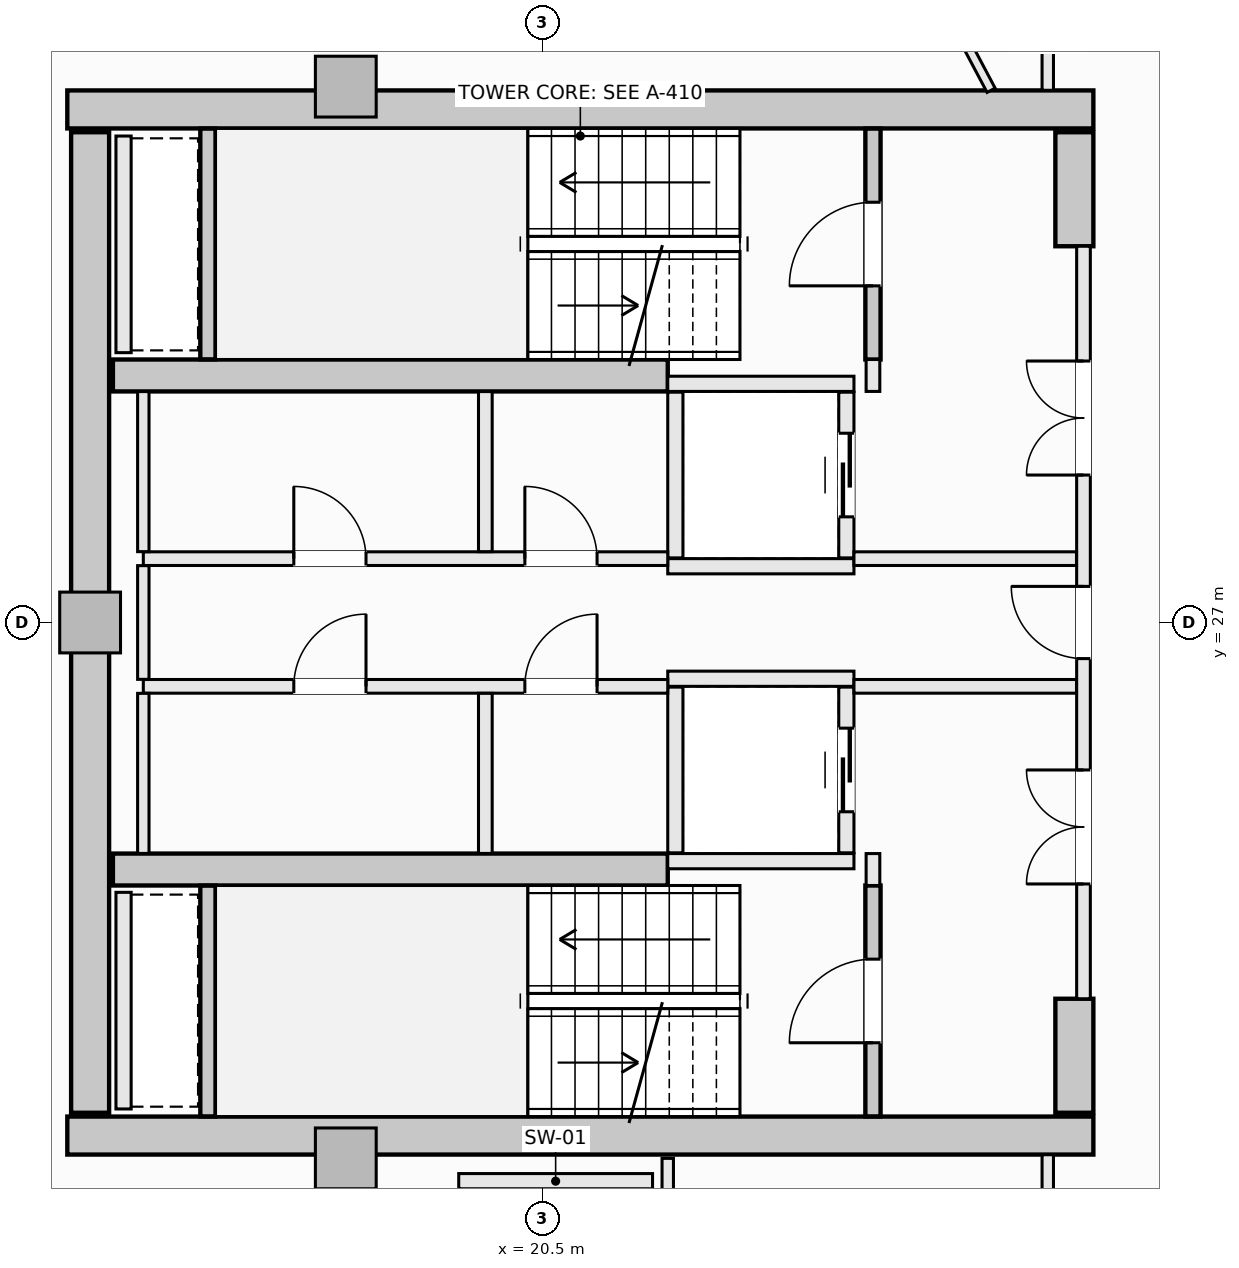
"""IFC4 building model, lengths in metres.
Left out: names, types, materials, properties, quantities, classifications, styles, units other than length and angle.
Written with IfcOpenShell. Run it as: python <this file> out.ifc"""

import sys

from ifc_helpers import new_model, si_unit, direction, frame, frame_2d, origin, origin_2d, place, context, subcontext, project, spatial, rectangle, extrude, element, fill, save


model = new_model("IFC4")
c1 = context("Model", 3, precision=1e-05, world=origin(), true_north=direction((0.0, 1.0)))
c2 = subcontext(c1, "Body", "Model", "MODEL_VIEW")
j1 = project(units=[si_unit("LENGTHUNIT", "METRE"), si_unit("PLANEANGLEUNIT", "RADIAN")], contexts=[c1])
p1 = place(None, origin())
s1 = spatial("IfcSite", under=j1, at=p1, CompositionType="ELEMENT")
p2 = place(p1, origin())
s2 = spatial("IfcBuilding", under=s1, at=p2, CompositionType="ELEMENT")
p3 = place(p2, frame((0.0, 0.0, 209.6)))
s3 = spatial("IfcBuildingStorey", under=s2, at=p3, CompositionType="ELEMENT", Elevation=209.6)
for number, where, z_axis, x_axis in (
    (1, (14.25, 33.75, -0.27), (0.0, 0.0, 1.0), (1.0, 0.0, 0.0)),
    (2, (14.25, 20.25, -0.27), (0.0, 0.0, 1.0), (1.0, 0.0, 0.0)),
):
    element("IfcWall", number, at=place(p3, frame(where, z_axis=z_axis, x_axis=x_axis)), inside=s3, PredefinedType="SHEAR", context=c2, shape_type="SweptSolid", body=[
        extrude(rectangle(XDim=13.5, YDim=0.5, at=frame_2d((6.75, 0.0))), origin(), (0.0, 0.0, 1.0), 3.3),
    ])
p4 = place(p3, frame((14.55, 20.55, -0.27), z_axis=(0.0, 0.0, 1.0), x_axis=(0.0, 1.0, 0.0)))
e3 = element("IfcWall", 3, at=p4, inside=s3, PredefinedType="SHEAR", context=c2, shape_type="SweptSolid", body=[
    extrude(rectangle(XDim=12.9, YDim=0.5, at=frame_2d((6.45, 0.0))), origin(), (0.0, 0.0, 1.0), 3.3),
])
for number, where, z_axis, x_axis in (
    (4, (27.5, 31.95, -0.27), (0.0, 0.0, 1.0), (0.0, 1.0, 0.0)),
    (5, (27.5, 20.55, -0.27), (0.0, 0.0, 1.0), (0.0, 1.0, 0.0)),
):
    element("IfcWall", number, at=place(p3, frame(where, z_axis=z_axis, x_axis=x_axis)), inside=s3, PredefinedType="SHEAR", context=c2, shape_type="SweptSolid", body=[
        extrude(rectangle(XDim=1.5, YDim=0.5, at=frame_2d((0.75, 0.0))), origin(), (0.0, 0.0, 1.0), 3.3),
    ])
for number, where, z_axis, x_axis in (
    (6, (14.85, 30.25, -0.27), (0.0, 0.0, 1.0), (1.0, 0.0, 0.0)),
    (7, (14.85, 23.75, -0.27), (0.0, 0.0, 1.0), (1.0, 0.0, 0.0)),
):
    element("IfcWall", number, at=place(p3, frame(where, z_axis=z_axis, x_axis=x_axis)), inside=s3, PredefinedType="SHEAR", context=c2, shape_type="SweptSolid", body=[
        extrude(rectangle(XDim=7.3, YDim=0.42, at=frame_2d((3.65, 0.0))), origin(), (0.0, 0.0, 1.0), 3.3),
    ])
for number, where, z_axis, x_axis in (
    (8, (17.914, 34.05, -0.27), (0.0, 0.0, 1.0), (1.0, 0.0, 0.0)),
    (9, (14.55, 27.0, -0.27), (0.0, 0.0, 1.0), (1.0, 0.0, 0.0)),
    (10, (17.914, 19.95, -0.27), (0.0, 0.0, 1.0), (1.0, 0.0, 0.0)),
):
    element("IfcColumn", number, at=place(p3, frame(where, z_axis=z_axis, x_axis=x_axis)), inside=s3, PredefinedType="PILASTER", context=c2, shape_type="SweptSolid", body=[
        extrude(rectangle(XDim=0.8, YDim=0.8, at=origin_2d()), origin(), (0.0, 0.0, 1.0), 3.3),
    ])
p5 = place(p3, frame((24.85, 30.46, -0.27), z_axis=(0.0, 0.0, 1.0), x_axis=(0.0, 1.0, 0.0)))
e11 = element("IfcWall", 11, at=p5, inside=s3, PredefinedType="SHEAR", context=c2, shape_type="SweptSolid", body=[
    extrude(rectangle(XDim=3.038, YDim=0.2, at=frame_2d((1.519, 0.0))), origin(), (0.0, 0.0, 1.0), 3.3),
])
p6 = place(p5, frame((0.969, 0.0, 0.27)))
e12 = element("IfcOpeningElement", 12, at=p6, cuts=e11, PredefinedType="OPENING", context=c2, shape_type="SweptSolid", body=[
    extrude(rectangle(XDim=1.1, YDim=2.15, at=frame_2d((0.55, 1.075))), frame((0.0, 0.11, 0.0), z_axis=(0.0, -1.0, 0.0), x_axis=(1.0, 0.0, 0.0)), (0.0, 0.0, 1.0), 0.22),
])
p7 = place(p3, frame((16.1, 30.462, -0.27), z_axis=(0.0, 0.0, 1.0), x_axis=(0.0, 1.0, 0.0)))
e13 = element("IfcWall", 13, at=p7, inside=s3, PredefinedType="SHEAR", context=c2, shape_type="SweptSolid", body=[
    extrude(rectangle(XDim=3.036, YDim=0.2, at=frame_2d((1.518, 0.0))), origin(), (0.0, 0.0, 1.0), 3.3),
])
p8 = place(p3, frame((24.85, 20.502, -0.27), z_axis=(0.0, 0.0, 1.0), x_axis=(0.0, 1.0, 0.0)))
e14 = element("IfcWall", 14, at=p8, inside=s3, PredefinedType="SHEAR", context=c2, shape_type="SweptSolid", body=[
    extrude(rectangle(XDim=3.038, YDim=0.2, at=frame_2d((1.519, 0.0))), origin(), (0.0, 0.0, 1.0), 3.3),
])
p9 = place(p8, frame((0.969, 0.0, 0.27)))
e15 = element("IfcOpeningElement", 15, at=p9, cuts=e14, PredefinedType="OPENING", context=c2, shape_type="SweptSolid", body=[
    extrude(rectangle(XDim=1.1, YDim=2.15, at=frame_2d((0.55, 1.075))), frame((0.0, 0.11, 0.0), z_axis=(0.0, -1.0, 0.0), x_axis=(1.0, 0.0, 0.0)), (0.0, 0.0, 1.0), 0.22),
])
p10 = place(p3, frame((16.1, 20.502, -0.27), z_axis=(0.0, 0.0, 1.0), x_axis=(0.0, 1.0, 0.0)))
e16 = element("IfcWall", 16, at=p10, inside=s3, PredefinedType="SHEAR", context=c2, shape_type="SweptSolid", body=[
    extrude(rectangle(XDim=3.036, YDim=0.2, at=frame_2d((1.518, 0.0))), origin(), (0.0, 0.0, 1.0), 3.3),
])
for number, where, z_axis, x_axis in (
    (17, (22.15, 30.14, 0.0), (0.0, 0.0, 1.0), (1.0, 0.0, 0.0)),
    (18, (22.15, 27.74, 0.0), (0.0, 0.0, 1.0), (1.0, 0.0, 0.0)),
):
    element("IfcWall", number, at=place(p3, frame(where, z_axis=z_axis, x_axis=x_axis)), inside=s3, PredefinedType="SOLIDWALL", context=c2, shape_type="SweptSolid", body=[
        extrude(rectangle(XDim=2.45, YDim=0.2, at=frame_2d((1.225, 0.0))), origin(), (0.0, 0.0, 1.0), 3.03),
    ])
p11 = place(p3, frame((22.25, 27.85, 0.0), z_axis=(0.0, 0.0, 1.0), x_axis=(0.0, 1.0, 0.0)))
e19 = element("IfcWall", 19, at=p11, inside=s3, PredefinedType="SOLIDWALL", context=c2, shape_type="SweptSolid", body=[
    extrude(rectangle(XDim=2.18, YDim=0.2, at=frame_2d((1.09, 0.0))), origin(), (0.0, 0.0, 1.0), 3.03),
])
p12 = place(p3, frame((24.5, 27.85, 0.0), z_axis=(0.0, 0.0, 1.0), x_axis=(0.0, 1.0, 0.0)))
e20 = element("IfcWall", 20, at=p12, inside=s3, PredefinedType="SOLIDWALL", context=c2, shape_type="SweptSolid", body=[
    extrude(rectangle(XDim=2.18, YDim=0.2, at=frame_2d((1.09, 0.0))), origin(), (0.0, 0.0, 1.0), 3.03),
])
p13 = place(p12, frame((0.54, 0.0, 0.0)))
e21 = element("IfcOpeningElement", 21, at=p13, cuts=e20, PredefinedType="OPENING", context=c2, shape_type="SweptSolid", body=[
    extrude(rectangle(XDim=1.1, YDim=2.2, at=frame_2d((0.55, 1.1))), frame((0.0, 0.11, 0.0), z_axis=(0.0, -1.0, 0.0), x_axis=(1.0, 0.0, 0.0)), (0.0, 0.0, 1.0), 0.22),
])
for number, where, z_axis, x_axis in (
    (22, (22.15, 26.26, 0.0), (0.0, 0.0, 1.0), (1.0, 0.0, 0.0)),
    (23, (22.15, 23.86, 0.0), (0.0, 0.0, 1.0), (1.0, 0.0, 0.0)),
):
    element("IfcWall", number, at=place(p3, frame(where, z_axis=z_axis, x_axis=x_axis)), inside=s3, PredefinedType="SOLIDWALL", context=c2, shape_type="SweptSolid", body=[
        extrude(rectangle(XDim=2.45, YDim=0.2, at=frame_2d((1.225, 0.0))), origin(), (0.0, 0.0, 1.0), 3.03),
    ])
p14 = place(p3, frame((22.25, 23.97, 0.0), z_axis=(0.0, 0.0, 1.0), x_axis=(0.0, 1.0, 0.0)))
e24 = element("IfcWall", 24, at=p14, inside=s3, PredefinedType="SOLIDWALL", context=c2, shape_type="SweptSolid", body=[
    extrude(rectangle(XDim=2.18, YDim=0.2, at=frame_2d((1.09, 0.0))), origin(), (0.0, 0.0, 1.0), 3.03),
])
p15 = place(p3, frame((24.5, 23.97, 0.0), z_axis=(0.0, 0.0, 1.0), x_axis=(0.0, 1.0, 0.0)))
e25 = element("IfcWall", 25, at=p15, inside=s3, PredefinedType="SOLIDWALL", context=c2, shape_type="SweptSolid", body=[
    extrude(rectangle(XDim=2.18, YDim=0.2, at=frame_2d((1.09, 0.0))), origin(), (0.0, 0.0, 1.0), 3.03),
])
p16 = place(p15, frame((0.54, 0.0, 0.0)))
e26 = element("IfcOpeningElement", 26, at=p16, cuts=e25, PredefinedType="OPENING", context=c2, shape_type="SweptSolid", body=[
    extrude(rectangle(XDim=1.1, YDim=2.2, at=frame_2d((0.55, 1.1))), frame((0.0, 0.11, 0.0), z_axis=(0.0, -1.0, 0.0), x_axis=(1.0, 0.0, 0.0)), (0.0, 0.0, 1.0), 0.22),
])
p17 = place(p3, frame((19.4, 19.65, 0.0), z_axis=(0.0, 0.0, 1.0), x_axis=(1.0, 0.0, 0.0)))
e27 = element("IfcWall", 27, at=p17, inside=s3, PredefinedType="SOLIDWALL", context=c2, shape_type="SweptSolid", body=[
    extrude(rectangle(XDim=2.55, YDim=0.2, at=frame_2d((1.275, 0.0))), origin(), (0.0, 0.0, 1.0), 3.03),
])
for number, where, z_axis, x_axis in (
    (28, (14.99, 30.55, 0.0), (0.0, 0.0, 1.0), (0.0, 1.0, 0.0)),
    (29, (14.99, 20.6, 0.0), (0.0, 0.0, 1.0), (0.0, 1.0, 0.0)),
):
    element("IfcWall", number, at=place(p3, frame(where, z_axis=z_axis, x_axis=x_axis)), inside=s3, PredefinedType="SOLIDWALL", context=c2, shape_type="SweptSolid", body=[
        extrude(rectangle(XDim=2.85, YDim=0.2, at=frame_2d((1.425, 0.0))), origin(), (0.0, 0.0, 1.0), 3.03),
    ])
for number, where, z_axis, x_axis in (
    (30, (24.85, 23.54, 0.0), (0.0, 0.0, 1.0), (0.0, 1.0, 0.0)),
    (31, (24.85, 30.04, 0.0), (0.0, 0.0, 1.0), (0.0, 1.0, 0.0)),
):
    element("IfcWall", number, at=place(p3, frame(where, z_axis=z_axis, x_axis=x_axis)), inside=s3, PredefinedType="SOLIDWALL", context=c2, shape_type="SweptSolid", body=[
        extrude(rectangle(XDim=0.42, YDim=0.18, at=frame_2d((0.21, 0.0))), origin(), (0.0, 0.0, 1.0), 3.03),
    ])
p18 = place(p3, frame((27.62, 22.05, 0.0), z_axis=(0.0, 0.0, 1.0), x_axis=(0.0, 1.0, 0.0)))
e32 = element("IfcWall", 32, at=p18, inside=s3, PredefinedType="SOLIDWALL", context=c2, shape_type="SweptSolid", body=[
    extrude(rectangle(XDim=9.9, YDim=0.18, at=frame_2d((4.95, 0.0))), origin(), (0.0, 0.0, 1.0), 3.03),
])
p19 = place(p18, frame((4.475, 0.0, 0.0)))
e33 = element("IfcOpeningElement", 33, at=p19, cuts=e32, PredefinedType="OPENING", context=c2, shape_type="SweptSolid", body=[
    extrude(rectangle(XDim=0.95, YDim=2.1, at=frame_2d((0.475, 1.05))), frame((0.0, 0.1, 0.0), z_axis=(0.0, -1.0, 0.0), x_axis=(1.0, 0.0, 0.0)), (0.0, 0.0, 1.0), 0.2),
])
p20 = place(p18, frame((6.89, 0.0, 0.0)))
e34 = element("IfcOpeningElement", 34, at=p20, cuts=e32, PredefinedType="OPENING", context=c2, shape_type="SweptSolid", body=[
    extrude(rectangle(XDim=1.5, YDim=2.2, at=frame_2d((0.75, 1.1))), frame((0.0, 0.1, 0.0), z_axis=(0.0, -1.0, 0.0), x_axis=(1.0, 0.0, 0.0)), (0.0, 0.0, 1.0), 0.2),
])
p21 = place(p18, frame((1.51, 0.0, 0.0)))
e35 = element("IfcOpeningElement", 35, at=p21, cuts=e32, PredefinedType="OPENING", context=c2, shape_type="SweptSolid", body=[
    extrude(rectangle(XDim=1.5, YDim=2.2, at=frame_2d((0.75, 1.1))), frame((0.0, 0.1, 0.0), z_axis=(0.0, -1.0, 0.0), x_axis=(1.0, 0.0, 0.0)), (0.0, 0.0, 1.0), 0.2),
])
p22 = place(p3, frame((15.25, 27.84, 0.0), z_axis=(0.0, 0.0, 1.0), x_axis=(1.0, 0.0, 0.0)))
e36 = element("IfcWall", 36, at=p22, inside=s3, PredefinedType="SOLIDWALL", context=c2, shape_type="SweptSolid", body=[
    extrude(rectangle(XDim=6.9, YDim=0.18, at=frame_2d((3.45, 0.0))), origin(), (0.0, 0.0, 1.0), 3.03),
])
p23 = place(p22, frame((5.02, 0.0, 0.0)))
e37 = element("IfcOpeningElement", 37, at=p23, cuts=e36, PredefinedType="OPENING", context=c2, shape_type="SweptSolid", body=[
    extrude(rectangle(XDim=0.95, YDim=2.1, at=frame_2d((0.475, 1.05))), frame((0.0, 0.1, 0.0), z_axis=(0.0, -1.0, 0.0), x_axis=(1.0, 0.0, 0.0)), (0.0, 0.0, 1.0), 0.2),
])
p24 = place(p22, frame((1.98, 0.0, 0.0)))
e38 = element("IfcOpeningElement", 38, at=p24, cuts=e36, PredefinedType="OPENING", context=c2, shape_type="SweptSolid", body=[
    extrude(rectangle(XDim=0.95, YDim=2.1, at=frame_2d((0.475, 1.05))), frame((0.0, 0.1, 0.0), z_axis=(0.0, -1.0, 0.0), x_axis=(1.0, 0.0, 0.0)), (0.0, 0.0, 1.0), 0.2),
])
p25 = place(p3, frame((24.6, 27.84, 0.0), z_axis=(0.0, 0.0, 1.0), x_axis=(1.0, 0.0, 0.0)))
e39 = element("IfcWall", 39, at=p25, inside=s3, PredefinedType="SOLIDWALL", context=c2, shape_type="SweptSolid", body=[
    extrude(rectangle(XDim=2.928, YDim=0.18, at=frame_2d((1.464, 0.0))), origin(), (0.0, 0.0, 1.0), 3.03),
])
p26 = place(p3, frame((15.25, 26.16, 0.0), z_axis=(0.0, 0.0, 1.0), x_axis=(1.0, 0.0, 0.0)))
e40 = element("IfcWall", 40, at=p26, inside=s3, PredefinedType="SOLIDWALL", context=c2, shape_type="SweptSolid", body=[
    extrude(rectangle(XDim=6.9, YDim=0.18, at=frame_2d((3.45, 0.0))), origin(), (0.0, 0.0, 1.0), 3.03),
])
p27 = place(p26, frame((5.02, 0.0, 0.0)))
e41 = element("IfcOpeningElement", 41, at=p27, cuts=e40, PredefinedType="OPENING", context=c2, shape_type="SweptSolid", body=[
    extrude(rectangle(XDim=0.95, YDim=2.1, at=frame_2d((0.475, 1.05))), frame((0.0, 0.1, 0.0), z_axis=(0.0, -1.0, 0.0), x_axis=(1.0, 0.0, 0.0)), (0.0, 0.0, 1.0), 0.2),
])
p28 = place(p26, frame((1.98, 0.0, 0.0)))
e42 = element("IfcOpeningElement", 42, at=p28, cuts=e40, PredefinedType="OPENING", context=c2, shape_type="SweptSolid", body=[
    extrude(rectangle(XDim=0.95, YDim=2.1, at=frame_2d((0.475, 1.05))), frame((0.0, 0.1, 0.0), z_axis=(0.0, -1.0, 0.0), x_axis=(1.0, 0.0, 0.0)), (0.0, 0.0, 1.0), 0.2),
])
p29 = place(p3, frame((24.6, 26.16, 0.0), z_axis=(0.0, 0.0, 1.0), x_axis=(1.0, 0.0, 0.0)))
e43 = element("IfcWall", 43, at=p29, inside=s3, PredefinedType="SOLIDWALL", context=c2, shape_type="SweptSolid", body=[
    extrude(rectangle(XDim=2.928, YDim=0.18, at=frame_2d((1.464, 0.0))), origin(), (0.0, 0.0, 1.0), 3.03),
])
p30 = place(p3, frame((15.25, 23.962, 0.0), z_axis=(0.0, 0.0, 1.0), x_axis=(0.0, 1.0, 0.0)))
e44 = element("IfcWall", 44, at=p30, inside=s3, PredefinedType="PARTITIONING", context=c2, shape_type="SweptSolid", body=[
    extrude(rectangle(XDim=2.106, YDim=0.15, at=frame_2d((1.053, 0.0))), origin(), (0.0, 0.0, 1.0), 3.03),
])
p31 = place(p3, frame((15.25, 26.252, 0.0), z_axis=(0.0, 0.0, 1.0), x_axis=(0.0, 1.0, 0.0)))
e45 = element("IfcWall", 45, at=p31, inside=s3, PredefinedType="PARTITIONING", context=c2, shape_type="SweptSolid", body=[
    extrude(rectangle(XDim=1.496, YDim=0.15, at=frame_2d((0.748, 0.0))), origin(), (0.0, 0.0, 1.0), 3.03),
])
p32 = place(p3, frame((15.25, 27.932, 0.0), z_axis=(0.0, 0.0, 1.0), x_axis=(0.0, 1.0, 0.0)))
e46 = element("IfcWall", 46, at=p32, inside=s3, PredefinedType="PARTITIONING", context=c2, shape_type="SweptSolid", body=[
    extrude(rectangle(XDim=2.106, YDim=0.15, at=frame_2d((1.053, 0.0))), origin(), (0.0, 0.0, 1.0), 3.03),
])
for number, where, z_axis, x_axis in (
    (47, (19.75, 23.962, 0.0), (0.0, 0.0, 1.0), (0.0, 1.0, 0.0)),
    (48, (19.75, 27.932, 0.0), (0.0, 0.0, 1.0), (0.0, 1.0, 0.0)),
):
    element("IfcWall", number, at=place(p3, frame(where, z_axis=z_axis, x_axis=x_axis)), inside=s3, PredefinedType="SOLIDWALL", context=c2, shape_type="SweptSolid", body=[
        extrude(rectangle(XDim=2.106, YDim=0.18, at=frame_2d((1.053, 0.0))), origin(), (0.0, 0.0, 1.0), 3.03),
    ])
p33 = place(p3, frame((22.15, 17.127, 0.0), z_axis=(0.0, 0.0, 1.0), x_axis=(0.0, 1.0, 0.0)))
e49 = element("IfcWall", 49, at=p33, inside=s3, PredefinedType="PARTITIONING", context=c2, shape_type="SweptSolid", body=[
    extrude(rectangle(XDim=2.823, YDim=0.15, at=frame_2d((1.412, 0.0))), origin(), (0.0, 0.0, 1.0), 3.03),
])
p34 = place(p3, frame((27.15, 17.127, 0.0), z_axis=(0.0, 0.0, 1.0), x_axis=(0.0, 1.0, 0.0)))
e50 = element("IfcWall", 50, at=p34, inside=s3, PredefinedType="PARTITIONING", context=c2, shape_type="SweptSolid", body=[
    extrude(rectangle(XDim=2.871, YDim=0.15, at=frame_2d((1.436, 0.0))), origin(), (0.0, 0.0, 1.0), 3.03),
])
p35 = place(p34, frame((0.96, 0.0, 0.0)))
e51 = element("IfcOpeningElement", 51, at=p35, cuts=e50, PredefinedType="OPENING", context=c2, shape_type="SweptSolid", body=[
    extrude(rectangle(XDim=0.95, YDim=2.1, at=frame_2d((0.475, 1.05))), frame((0.0, 0.085, 0.0), z_axis=(0.0, -1.0, 0.0), x_axis=(1.0, 0.0, 0.0)), (0.0, 0.0, 1.0), 0.17),
])
p36 = place(p3, frame((27.15, 34.002, 0.0), z_axis=(0.0, 0.0, 1.0), x_axis=(0.0, 1.0, 0.0)))
e52 = element("IfcWall", 52, at=p36, inside=s3, PredefinedType="PARTITIONING", context=c2, shape_type="SweptSolid", body=[
    extrude(rectangle(XDim=4.198, YDim=0.15, at=frame_2d((2.099, 0.0))), origin(), (0.0, 0.0, 1.0), 3.03),
])
p37 = place(p36, frame((1.998, 0.0, 0.0)))
e53 = element("IfcOpeningElement", 53, at=p37, cuts=e52, PredefinedType="OPENING", context=c2, shape_type="SweptSolid", body=[
    extrude(rectangle(XDim=0.95, YDim=2.1, at=frame_2d((0.475, 1.05))), frame((0.0, 0.085, 0.0), z_axis=(0.0, -1.0, 0.0), x_axis=(1.0, 0.0, 0.0)), (0.0, 0.0, 1.0), 0.17),
])
p38 = place(p3, frame((25.831, 35.083, 0.0), z_axis=(0.0, 0.0, 1.0), x_axis=(0.468630025993, -0.883394531757, 0.0)))
e54 = element("IfcWall", 54, at=p38, inside=s3, PredefinedType="PARTITIONING", context=c2, shape_type="SweptSolid", body=[
    extrude(rectangle(XDim=1.224, YDim=0.12, at=frame_2d((0.612, 0.0))), origin(), (0.0, 0.0, 1.0), 3.03),
])
p39 = place(p6, origin())
e55 = element("IfcDoor", 55, at=p39, inside=s3, OperationType="SINGLE_SWING_LEFT", PredefinedType="DOOR", context=c2, shape_type="SweptSolid", body=[
    extrude(rectangle(XDim=1.1, YDim=2.15, at=frame_2d((0.55, 1.075))), frame((0.0, 0.025, 0.0), z_axis=(0.0, -1.0, 0.0), x_axis=(1.0, 0.0, 0.0)), (0.0, 0.0, 1.0), 0.05),
])
fill(e12, e55)
p40 = place(p9, origin())
e56 = element("IfcDoor", 56, at=p40, inside=s3, OperationType="SINGLE_SWING_LEFT", PredefinedType="DOOR", context=c2, shape_type="SweptSolid", body=[
    extrude(rectangle(XDim=1.1, YDim=2.15, at=frame_2d((0.55, 1.075))), frame((0.0, 0.025, 0.0), z_axis=(0.0, -1.0, 0.0), x_axis=(1.0, 0.0, 0.0)), (0.0, 0.0, 1.0), 0.05),
])
fill(e15, e56)
p41 = place(p13, origin())
e57 = element("IfcDoor", 57, at=p41, inside=s3, OperationType="SLIDING_TO_LEFT", PredefinedType="DOOR", context=c2, shape_type="SweptSolid", body=[
    extrude(rectangle(XDim=1.1, YDim=2.2, at=frame_2d((0.55, 1.1))), frame((0.0, 0.025, 0.0), z_axis=(0.0, -1.0, 0.0), x_axis=(1.0, 0.0, 0.0)), (0.0, 0.0, 1.0), 0.05),
])
fill(e21, e57)
p42 = place(p16, origin())
e58 = element("IfcDoor", 58, at=p42, inside=s3, OperationType="SLIDING_TO_LEFT", PredefinedType="DOOR", context=c2, shape_type="SweptSolid", body=[
    extrude(rectangle(XDim=1.1, YDim=2.2, at=frame_2d((0.55, 1.1))), frame((0.0, 0.025, 0.0), z_axis=(0.0, -1.0, 0.0), x_axis=(1.0, 0.0, 0.0)), (0.0, 0.0, 1.0), 0.05),
])
fill(e26, e58)
p43 = place(p19, origin())
e59 = element("IfcDoor", 59, at=p43, inside=s3, OperationType="SINGLE_SWING_RIGHT", PredefinedType="DOOR", context=c2, shape_type="SweptSolid", body=[
    extrude(rectangle(XDim=0.95, YDim=2.1, at=frame_2d((0.475, 1.05))), frame((0.0, 0.025, 0.0), z_axis=(0.0, -1.0, 0.0), x_axis=(1.0, 0.0, 0.0)), (0.0, 0.0, 1.0), 0.05),
])
fill(e33, e59)
p44 = place(p20, origin())
e60 = element("IfcDoor", 60, at=p44, inside=s3, OperationType="DOUBLE_DOOR_SINGLE_SWING", PredefinedType="DOOR", context=c2, shape_type="SweptSolid", body=[
    extrude(rectangle(XDim=1.5, YDim=2.2, at=frame_2d((0.75, 1.1))), frame((0.0, 0.025, 0.0), z_axis=(0.0, -1.0, 0.0), x_axis=(1.0, 0.0, 0.0)), (0.0, 0.0, 1.0), 0.05),
])
fill(e34, e60)
p45 = place(p21, origin())
e61 = element("IfcDoor", 61, at=p45, inside=s3, OperationType="DOUBLE_DOOR_SINGLE_SWING", PredefinedType="DOOR", context=c2, shape_type="SweptSolid", body=[
    extrude(rectangle(XDim=1.5, YDim=2.2, at=frame_2d((0.75, 1.1))), frame((0.0, 0.025, 0.0), z_axis=(0.0, -1.0, 0.0), x_axis=(1.0, 0.0, 0.0)), (0.0, 0.0, 1.0), 0.05),
])
fill(e35, e61)
p46 = place(p23, origin())
e62 = element("IfcDoor", 62, at=p46, inside=s3, OperationType="SINGLE_SWING_LEFT", PredefinedType="DOOR", context=c2, shape_type="SweptSolid", body=[
    extrude(rectangle(XDim=0.95, YDim=2.1, at=frame_2d((0.475, 1.05))), frame((0.0, 0.025, 0.0), z_axis=(0.0, -1.0, 0.0), x_axis=(1.0, 0.0, 0.0)), (0.0, 0.0, 1.0), 0.05),
])
fill(e37, e62)
p47 = place(p27, origin())
e63 = element("IfcDoor", 63, at=p47, inside=s3, OperationType="SINGLE_SWING_RIGHT", PredefinedType="DOOR", context=c2, shape_type="SweptSolid", body=[
    extrude(rectangle(XDim=0.95, YDim=2.1, at=frame_2d((0.475, 1.05))), frame((0.0, 0.025, 0.0), z_axis=(0.0, -1.0, 0.0), x_axis=(1.0, 0.0, 0.0)), (0.0, 0.0, 1.0), 0.05),
])
fill(e41, e63)
p48 = place(p24, origin())
e64 = element("IfcDoor", 64, at=p48, inside=s3, OperationType="SINGLE_SWING_LEFT", PredefinedType="DOOR", context=c2, shape_type="SweptSolid", body=[
    extrude(rectangle(XDim=0.95, YDim=2.1, at=frame_2d((0.475, 1.05))), frame((0.0, 0.025, 0.0), z_axis=(0.0, -1.0, 0.0), x_axis=(1.0, 0.0, 0.0)), (0.0, 0.0, 1.0), 0.05),
])
fill(e38, e64)
p49 = place(p28, origin())
e65 = element("IfcDoor", 65, at=p49, inside=s3, OperationType="SINGLE_SWING_RIGHT", PredefinedType="DOOR", context=c2, shape_type="SweptSolid", body=[
    extrude(rectangle(XDim=0.95, YDim=2.1, at=frame_2d((0.475, 1.05))), frame((0.0, 0.025, 0.0), z_axis=(0.0, -1.0, 0.0), x_axis=(1.0, 0.0, 0.0)), (0.0, 0.0, 1.0), 0.05),
])
fill(e42, e65)
save(model, sys.argv[1])
